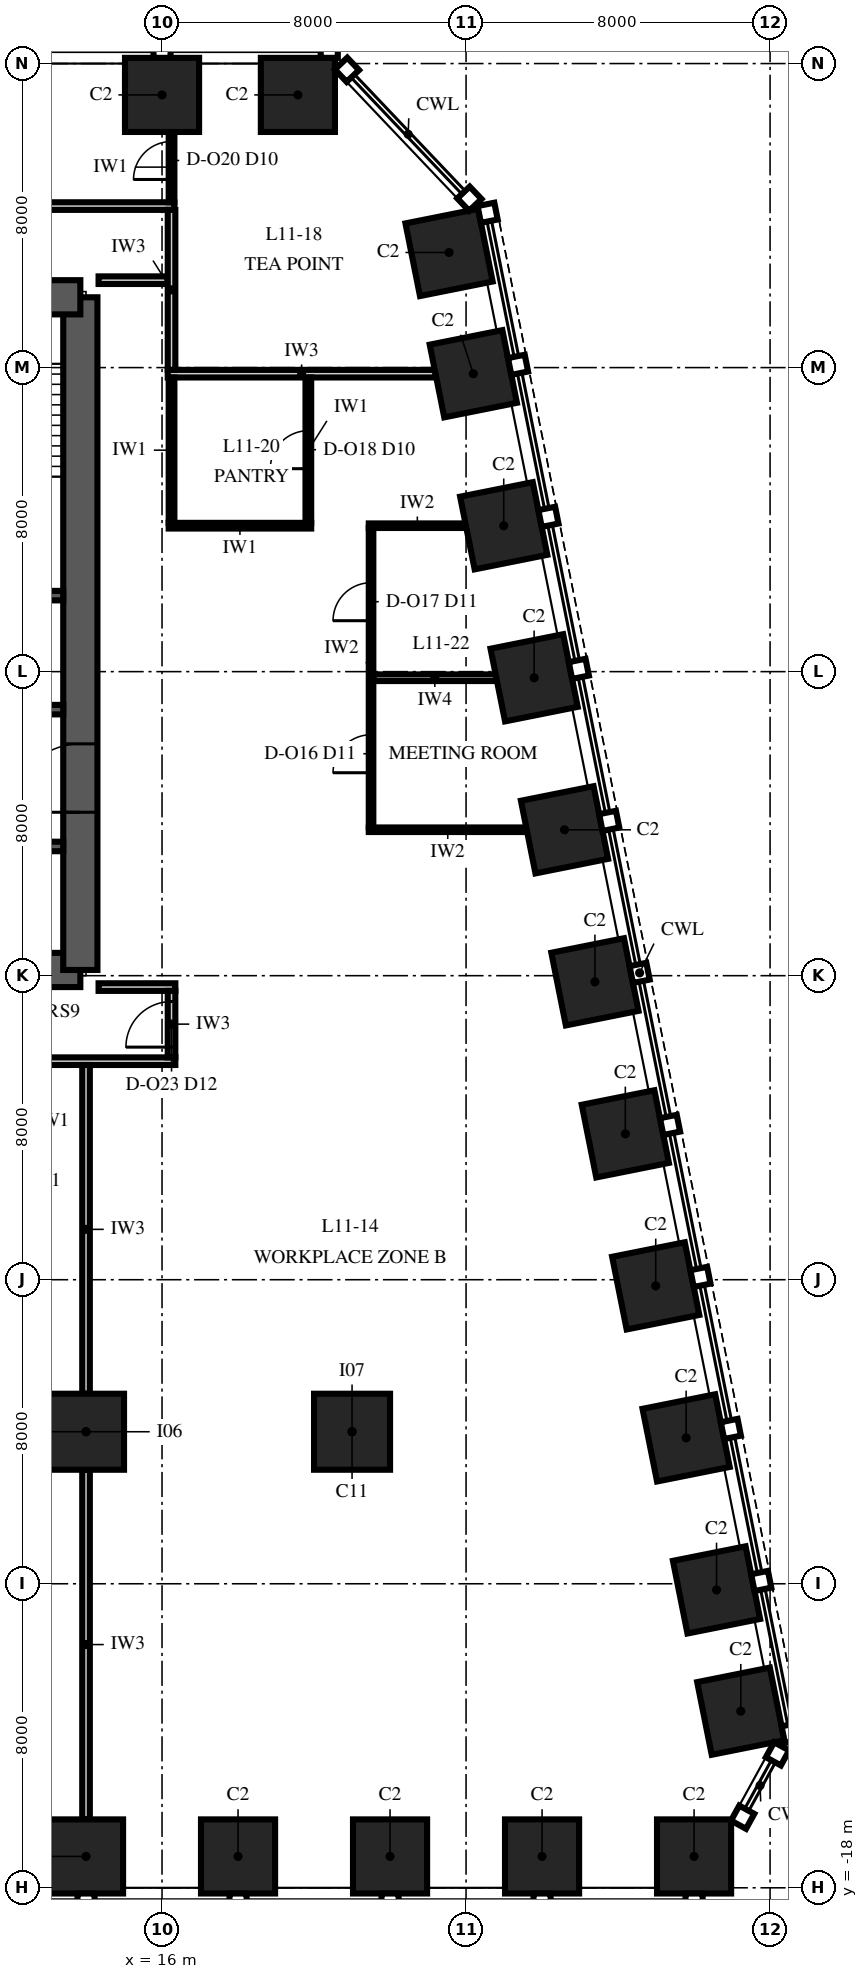
"""IFC4 building model, lengths in metres.
Left out: names, types, materials, properties, quantities, classifications, styles, units other than length and angle.
Written with IfcOpenShell. Run it as: python <this file> out.ifc"""

import sys

from ifc_helpers import new_model, si_unit, direction, frame, frame_2d, origin, origin_2d, place, context, subcontext, project, spatial, polyline, rectangle, outline, extrude, element, fill, save


model = new_model("IFC4")
c1 = context("Model", 3, precision=1e-05, world=origin(), true_north=direction((0.0, 1.0)))
c2 = subcontext(c1, "Body", "Model", "MODEL_VIEW")
j1 = project(units=[si_unit("LENGTHUNIT", "METRE"), si_unit("PLANEANGLEUNIT", "RADIAN")], contexts=[c1])
p1 = place(None, origin())
s1 = spatial("IfcSite", under=j1, at=p1, CompositionType="ELEMENT")
p2 = place(p1, origin())
s2 = spatial("IfcBuilding", under=s1, at=p2, CompositionType="ELEMENT")
p3 = place(p2, frame((0.0, 0.0, 56.0)))
s3 = spatial("IfcBuildingStorey", under=s2, at=p3, CompositionType="ELEMENT", Elevation=56.0)
for number, where, z_axis, x_axis in (
    (1, (14.0, -17.175, 0.0), (0.0, 0.0, 1.0), (1.0, 0.0, 0.0)),
    (2, (18.0, -17.175, 0.0), (0.0, 0.0, 1.0), (1.0, 0.0, 0.0)),
    (3, (22.0, -17.175, 0.0), (0.0, 0.0, 1.0), (1.0, 0.0, 0.0)),
    (4, (26.0, -17.175, 0.0), (0.0, 0.0, 1.0), (1.0, 0.0, 0.0)),
    (5, (30.0, -17.175, 0.0), (0.0, 0.0, 1.0), (1.0, 0.0, 0.0)),
    (6, (31.229, -13.353, 0.0), (0.0, 0.0, 1.0), (-0.196, 0.981, 0.0)),
    (7, (30.591, -10.162, 0.0), (0.0, 0.0, 1.0), (-0.196, 0.981, 0.0)),
    (8, (29.791, -6.162, 0.0), (0.0, 0.0, 1.0), (-0.196, 0.981, 0.0)),
    (9, (28.991, -2.162, 0.0), (0.0, 0.0, 1.0), (-0.196, 0.981, 0.0)),
    (10, (28.191, 1.838, 0.0), (0.0, 0.0, 1.0), (-0.196, 0.981, 0.0)),
    (11, (27.391, 5.838, 0.0), (0.0, 0.0, 1.0), (-0.196, 0.981, 0.0)),
    (12, (26.591, 9.838, 0.0), (0.0, 0.0, 1.0), (-0.196, 0.981, 0.0)),
    (13, (25.791, 13.838, 0.0), (0.0, 0.0, 1.0), (-0.196, 0.981, 0.0)),
    (14, (24.991, 17.838, 0.0), (0.0, 0.0, 1.0), (-0.196, 0.981, 0.0)),
    (15, (24.191, 21.838, 0.0), (0.0, 0.0, 1.0), (-0.196, 0.981, 0.0)),
    (16, (23.553, 25.029, 0.0), (0.0, 0.0, 1.0), (-0.196, 0.981, 0.0)),
    (17, (19.575, 29.175, 0.0), (0.0, 0.0, 1.0), (-1.0, 0.0, 0.0)),
    (18, (16.0, 29.175, 0.0), (0.0, 0.0, 1.0), (-1.0, 0.0, 0.0)),
):
    element("IfcColumn", number, at=place(p3, frame(where, z_axis=z_axis, x_axis=x_axis)), inside=s3, PredefinedType="COLUMN", context=c2, shape_type="SweptSolid", body=[
        extrude(rectangle(XDim=1.95, YDim=1.95, at=origin_2d()), origin(), (0.0, 0.0, 1.0), 4.0),
    ])
for number, where, z_axis, x_axis in (
    (19, (14.0, -6.0, 0.0), (0.0, 0.0, 1.0), (1.0, 0.0, 0.0)),
    (20, (21.0, -6.0, 0.0), (0.0, 0.0, 1.0), (1.0, 0.0, 0.0)),
):
    element("IfcColumn", number, at=place(p3, frame(where, z_axis=z_axis, x_axis=x_axis)), inside=s3, PredefinedType="COLUMN", context=c2, shape_type="SweptSolid", body=[
        extrude(rectangle(XDim=2.0, YDim=2.0, at=origin_2d()), origin(), (0.0, 0.0, 1.0), 4.0),
    ])
p4 = place(p3, frame((-13.85, 6.15, 0.0), z_axis=(0.0, 0.0, 1.0), x_axis=(1.0, 0.0, 0.0)))
e21 = element("IfcWall", 21, at=p4, inside=s3, PredefinedType="SHEAR", context=c2, shape_type="SweptSolid", body=[
    extrude(rectangle(XDim=27.7, YDim=0.9, at=frame_2d((13.85, 0.0))), origin(), (0.0, 0.0, 1.0), 4.0),
])
p5 = place(p3, frame((13.85, 6.15, 0.0), z_axis=(0.0, 0.0, 1.0), x_axis=(0.0, 1.0, 0.0)))
e22 = element("IfcWall", 22, at=p5, inside=s3, PredefinedType="SHEAR", context=c2, shape_type="SweptSolid", body=[
    extrude(outline(polyline([(0.0, -0.45), (17.7, -0.45), (17.7, 0.0), (17.25, 0.0), (17.25, 0.45), (0.45, 0.45), (0.45, 0.0), (0.0, 0.0), (0.0, -0.45)])), origin(), (0.0, 0.0, 1.0), 4.0),
])
p6 = place(p5, frame((4.15, 0.0, 0.0)))
e23 = element("IfcOpeningElement", 23, at=p6, cuts=e22, PredefinedType="OPENING", context=c2, shape_type="SweptSolid", body=[
    extrude(rectangle(XDim=1.8, YDim=2.4, at=frame_2d((0.9, 1.2))), frame((0.0, 0.465, 0.0), z_axis=(0.0, -1.0, 0.0), x_axis=(1.0, 0.0, 0.0)), (0.0, 0.0, 1.0), 0.93),
])
p7 = place(p3, frame((13.85, 23.85, 0.0), z_axis=(0.0, 0.0, 1.0), x_axis=(-1.0, 0.0, 0.0)))
e24 = element("IfcWall", 24, at=p7, inside=s3, PredefinedType="SHEAR", context=c2, shape_type="SweptSolid", body=[
    extrude(rectangle(XDim=27.7, YDim=0.9, at=frame_2d((13.85, 0.0))), origin(), (0.0, 0.0, 1.0), 4.0),
])
p8 = place(p7, frame((21.75, 0.0, 0.0)))
e25 = element("IfcOpeningElement", 25, at=p8, cuts=e24, PredefinedType="OPENING", context=c2, shape_type="SweptSolid", body=[
    extrude(rectangle(XDim=1.0, YDim=2.1, at=frame_2d((0.5, 1.05))), frame((0.0, 0.465, 0.0), z_axis=(0.0, -1.0, 0.0), x_axis=(1.0, 0.0, 0.0)), (0.0, 0.0, 1.0), 0.93),
])
p9 = place(p7, frame((4.95, 0.0, 0.0)))
e26 = element("IfcOpeningElement", 26, at=p9, cuts=e24, PredefinedType="OPENING", context=c2, shape_type="SweptSolid", body=[
    extrude(rectangle(XDim=1.0, YDim=2.1, at=frame_2d((0.5, 1.05))), frame((0.0, 0.465, 0.0), z_axis=(0.0, -1.0, 0.0), x_axis=(1.0, 0.0, 0.0)), (0.0, 0.0, 1.0), 0.93),
])
p10 = place(p7, frame((17.35, 0.0, 0.0)))
e27 = element("IfcOpeningElement", 27, at=p10, cuts=e24, PredefinedType="OPENING", context=c2, shape_type="SweptSolid", body=[
    extrude(rectangle(XDim=1.0, YDim=2.1, at=frame_2d((0.5, 1.05))), frame((0.0, 0.465, 0.0), z_axis=(0.0, -1.0, 0.0), x_axis=(1.0, 0.0, 0.0)), (0.0, 0.0, 1.0), 0.93),
])
p11 = place(p7, frame((13.35, 0.0, 0.0)))
e28 = element("IfcOpeningElement", 28, at=p11, cuts=e24, PredefinedType="OPENING", context=c2, shape_type="SweptSolid", body=[
    extrude(rectangle(XDim=1.0, YDim=2.1, at=frame_2d((0.5, 1.05))), frame((0.0, 0.465, 0.0), z_axis=(0.0, -1.0, 0.0), x_axis=(1.0, 0.0, 0.0)), (0.0, 0.0, 1.0), 0.93),
])
p12 = place(p7, frame((9.35, 0.0, 0.0)))
e29 = element("IfcOpeningElement", 29, at=p12, cuts=e24, PredefinedType="OPENING", context=c2, shape_type="SweptSolid", body=[
    extrude(rectangle(XDim=1.0, YDim=2.1, at=frame_2d((0.5, 1.05))), frame((0.0, 0.465, 0.0), z_axis=(0.0, -1.0, 0.0), x_axis=(1.0, 0.0, 0.0)), (0.0, 0.0, 1.0), 0.93),
])
p13 = place(p3, frame((-13.4, 9.4, 0.0), z_axis=(0.0, 0.0, 1.0), x_axis=(1.0, 0.0, 0.0)))
e30 = element("IfcWall", 30, at=p13, inside=s3, PredefinedType="SHEAR", context=c2, shape_type="SweptSolid", body=[
    extrude(rectangle(XDim=26.8, YDim=0.25, at=frame_2d((13.4, 0.0))), origin(), (0.0, 0.0, 1.0), 4.0),
])
p14 = place(p13, frame((0.25, 0.0, 0.0)))
e31 = element("IfcOpeningElement", 31, at=p14, cuts=e30, PredefinedType="OPENING", context=c2, shape_type="SweptSolid", body=[
    extrude(rectangle(XDim=1.1, YDim=2.1, at=frame_2d((0.55, 1.05))), frame((0.0, 0.14, 0.0), z_axis=(0.0, -1.0, 0.0), x_axis=(1.0, 0.0, 0.0)), (0.0, 0.0, 1.0), 0.28),
])
p15 = place(p13, frame((3.05, 0.0, 0.0)))
e32 = element("IfcOpeningElement", 32, at=p15, cuts=e30, PredefinedType="OPENING", context=c2, shape_type="SweptSolid", body=[
    extrude(rectangle(XDim=1.1, YDim=2.1, at=frame_2d((0.55, 1.05))), frame((0.0, 0.14, 0.0), z_axis=(0.0, -1.0, 0.0), x_axis=(1.0, 0.0, 0.0)), (0.0, 0.0, 1.0), 0.28),
])
p16 = place(p13, frame((5.85, 0.0, 0.0)))
e33 = element("IfcOpeningElement", 33, at=p16, cuts=e30, PredefinedType="OPENING", context=c2, shape_type="SweptSolid", body=[
    extrude(rectangle(XDim=1.1, YDim=2.1, at=frame_2d((0.55, 1.05))), frame((0.0, 0.14, 0.0), z_axis=(0.0, -1.0, 0.0), x_axis=(1.0, 0.0, 0.0)), (0.0, 0.0, 1.0), 0.28),
])
p17 = place(p3, frame((-13.4, 13.0, 0.0), z_axis=(0.0, 0.0, 1.0), x_axis=(1.0, 0.0, 0.0)))
e34 = element("IfcWall", 34, at=p17, inside=s3, PredefinedType="SHEAR", context=c2, shape_type="SweptSolid", body=[
    extrude(rectangle(XDim=26.8, YDim=0.25, at=frame_2d((13.4, 0.0))), origin(), (0.0, 0.0, 1.0), 4.0),
])
p18 = place(p17, frame((0.25, 0.0, 0.0)))
e35 = element("IfcOpeningElement", 35, at=p18, cuts=e34, PredefinedType="OPENING", context=c2, shape_type="SweptSolid", body=[
    extrude(rectangle(XDim=1.1, YDim=2.1, at=frame_2d((0.55, 1.05))), frame((0.0, 0.14, 0.0), z_axis=(0.0, -1.0, 0.0), x_axis=(1.0, 0.0, 0.0)), (0.0, 0.0, 1.0), 0.28),
])
p19 = place(p17, frame((8.65, 0.0, 0.0)))
e36 = element("IfcOpeningElement", 36, at=p19, cuts=e34, PredefinedType="OPENING", context=c2, shape_type="SweptSolid", body=[
    extrude(rectangle(XDim=1.1, YDim=2.1, at=frame_2d((0.55, 1.05))), frame((0.0, 0.14, 0.0), z_axis=(0.0, -1.0, 0.0), x_axis=(1.0, 0.0, 0.0)), (0.0, 0.0, 1.0), 0.28),
])
p20 = place(p17, frame((12.05, 0.0, 0.0)))
e37 = element("IfcOpeningElement", 37, at=p20, cuts=e34, PredefinedType="OPENING", context=c2, shape_type="SweptSolid", body=[
    extrude(rectangle(XDim=1.1, YDim=2.1, at=frame_2d((0.55, 1.05))), frame((0.0, 0.14, 0.0), z_axis=(0.0, -1.0, 0.0), x_axis=(1.0, 0.0, 0.0)), (0.0, 0.0, 1.0), 0.28),
])
p21 = place(p17, frame((15.25, 0.0, 0.0)))
e38 = element("IfcOpeningElement", 38, at=p21, cuts=e34, PredefinedType="OPENING", context=c2, shape_type="SweptSolid", body=[
    extrude(rectangle(XDim=0.9, YDim=2.1, at=frame_2d((0.45, 1.05))), frame((0.0, 0.14, 0.0), z_axis=(0.0, -1.0, 0.0), x_axis=(1.0, 0.0, 0.0)), (0.0, 0.0, 1.0), 0.28),
])
p22 = place(p17, frame((17.65, 0.0, 0.0)))
e39 = element("IfcOpeningElement", 39, at=p22, cuts=e34, PredefinedType="OPENING", context=c2, shape_type="SweptSolid", body=[
    extrude(rectangle(XDim=0.9, YDim=2.1, at=frame_2d((0.45, 1.05))), frame((0.0, 0.14, 0.0), z_axis=(0.0, -1.0, 0.0), x_axis=(1.0, 0.0, 0.0)), (0.0, 0.0, 1.0), 0.28),
])
p23 = place(p3, frame((-13.4, 16.0, 0.0), z_axis=(0.0, 0.0, 1.0), x_axis=(1.0, 0.0, 0.0)))
e40 = element("IfcWall", 40, at=p23, inside=s3, PredefinedType="SHEAR", context=c2, shape_type="SweptSolid", body=[
    extrude(rectangle(XDim=26.8, YDim=0.25, at=frame_2d((13.4, 0.0))), origin(), (0.0, 0.0, 1.0), 4.0),
])
p24 = place(p3, frame((-16.35, 3.75, 0.0), z_axis=(0.0, 0.0, 1.0), x_axis=(1.0, 0.0, 0.0)))
e41 = element("IfcWall", 41, at=p24, inside=s3, PredefinedType="PARTITIONING", context=c2, shape_type="SweptSolid", body=[
    extrude(rectangle(XDim=32.7, YDim=0.2, at=frame_2d((16.35, 0.0))), origin(), (0.0, 0.0, 1.0), 3.25),
])
p25 = place(p24, frame((15.75, 0.0, 0.0)))
e42 = element("IfcOpeningElement", 42, at=p25, cuts=e41, PredefinedType="OPENING", context=c2, shape_type="SweptSolid", body=[
    extrude(rectangle(XDim=1.2, YDim=2.4, at=frame_2d((0.6, 1.2))), frame((0.0, 0.115, 0.0), z_axis=(0.0, -1.0, 0.0), x_axis=(1.0, 0.0, 0.0)), (0.0, 0.0, 1.0), 0.23),
])
p26 = place(p3, frame((14.33, 5.7, 0.0), z_axis=(0.0, 0.0, 1.0), x_axis=(1.0, 0.0, 0.0)))
e43 = element("IfcWall", 43, at=p26, inside=s3, PredefinedType="PARTITIONING", context=c2, shape_type="SweptSolid", body=[
    extrude(rectangle(XDim=2.02, YDim=0.2, at=frame_2d((1.01, 0.0))), origin(), (0.0, 0.0, 1.0), 3.85),
])
p27 = place(p3, frame((21.44, 9.84, 0.0), z_axis=(0.0, 0.0, 1.0), x_axis=(1.0, 0.0, 0.0)))
e44 = element("IfcWall", 44, at=p27, inside=s3, PredefinedType="PARTITIONING", context=c2, shape_type="SweptSolid", body=[
    extrude(rectangle(XDim=4.156, YDim=0.12, at=frame_2d((2.078, 0.0))), origin(), (0.0, 0.0, 1.0), 3.25),
])
p28 = place(p3, frame((21.56, 13.84, 0.0), z_axis=(0.0, 0.0, 1.0), x_axis=(1.0, 0.0, 0.0)))
e45 = element("IfcWall", 45, at=p28, inside=s3, PredefinedType="PARTITIONING", context=c2, shape_type="SweptSolid", body=[
    extrude(rectangle(XDim=3.236, YDim=0.175, at=frame_2d((1.618, 0.0))), origin(), (0.0, 0.0, 1.0), 3.25),
])
p29 = place(p3, frame((16.175, 17.84, 0.0), z_axis=(0.0, 0.0, 1.0), x_axis=(1.0, 0.0, 0.0)))
e46 = element("IfcWall", 46, at=p29, inside=s3, PredefinedType="PARTITIONING", context=c2, shape_type="SweptSolid", body=[
    extrude(rectangle(XDim=3.75, YDim=0.15, at=frame_2d((1.875, 0.0))), origin(), (0.0, 0.0, 1.0), 3.25),
])
p30 = place(p3, frame((21.44, 17.84, 0.0), z_axis=(0.0, 0.0, 1.0), x_axis=(1.0, 0.0, 0.0)))
e47 = element("IfcWall", 47, at=p30, inside=s3, PredefinedType="PARTITIONING", context=c2, shape_type="SweptSolid", body=[
    extrude(rectangle(XDim=2.556, YDim=0.12, at=frame_2d((1.278, 0.0))), origin(), (0.0, 0.0, 1.0), 3.25),
])
p31 = place(p3, frame((16.15, 21.84, 0.0), z_axis=(0.0, 0.0, 1.0), x_axis=(1.0, 0.0, 0.0)))
e48 = element("IfcWall", 48, at=p31, inside=s3, PredefinedType="PARTITIONING", context=c2, shape_type="SweptSolid", body=[
    extrude(rectangle(XDim=7.046, YDim=0.2, at=frame_2d((3.523, 0.0))), origin(), (0.0, 0.0, 1.0), 3.25),
])
p32 = place(p3, frame((14.33, 24.3, 0.0), z_axis=(0.0, 0.0, 1.0), x_axis=(1.0, 0.0, 0.0)))
e49 = element("IfcWall", 49, at=p32, inside=s3, PredefinedType="PARTITIONING", context=c2, shape_type="SweptSolid", body=[
    extrude(rectangle(XDim=1.82, YDim=0.2, at=frame_2d((0.91, 0.0))), origin(), (0.0, 0.0, 1.0), 3.4),
])
p33 = place(p3, frame((-16.31, 26.25, 0.0), z_axis=(0.0, 0.0, 1.0), x_axis=(1.0, 0.0, 0.0)))
e50 = element("IfcWall", 50, at=p33, inside=s3, PredefinedType="PARTITIONING", context=c2, shape_type="SweptSolid", body=[
    extrude(rectangle(XDim=32.635, YDim=0.2, at=frame_2d((16.317, 0.0))), origin(), (0.0, 0.0, 1.0), 3.4),
])
p34 = place(p33, frame((15.71, 0.0, 0.0)))
e51 = element("IfcOpeningElement", 51, at=p34, cuts=e50, PredefinedType="OPENING", context=c2, shape_type="SweptSolid", body=[
    extrude(rectangle(XDim=1.2, YDim=2.4, at=frame_2d((0.6, 1.2))), frame((0.0, 0.115, 0.0), z_axis=(0.0, -1.0, 0.0), x_axis=(1.0, 0.0, 0.0)), (0.0, 0.0, 1.0), 0.23),
])
p35 = place(p3, frame((14.0, -16.2, 0.0), z_axis=(0.0, 0.0, 1.0), x_axis=(0.0, 1.0, 0.0)))
e52 = element("IfcWall", 52, at=p35, inside=s3, PredefinedType="PARTITIONING", context=c2, shape_type="SweptSolid", body=[
    extrude(rectangle(XDim=9.2, YDim=0.2, at=frame_2d((4.6, 0.0))), origin(), (0.0, 0.0, 1.0), 3.25),
])
p36 = place(p3, frame((14.0, -5.0, 0.0), z_axis=(0.0, 0.0, 1.0), x_axis=(0.0, 1.0, 0.0)))
e53 = element("IfcWall", 53, at=p36, inside=s3, PredefinedType="PARTITIONING", context=c2, shape_type="SweptSolid", body=[
    extrude(rectangle(XDim=8.65, YDim=0.2, at=frame_2d((4.325, 0.0))), origin(), (0.0, 0.0, 1.0), 3.25),
])
p37 = place(p3, frame((16.25, 3.85, 0.0), z_axis=(0.0, 0.0, 1.0), x_axis=(0.0, 1.0, 0.0)))
e54 = element("IfcWall", 54, at=p37, inside=s3, PredefinedType="PARTITIONING", context=c2, shape_type="SweptSolid", body=[
    extrude(rectangle(XDim=1.75, YDim=0.2, at=frame_2d((0.875, 0.0))), origin(), (0.0, 0.0, 1.0), 3.85),
])
p38 = place(p37, frame((0.27, 0.0, 0.0)))
e55 = element("IfcOpeningElement", 55, at=p38, cuts=e54, PredefinedType="OPENING", context=c2, shape_type="SweptSolid", body=[
    extrude(rectangle(XDim=1.2, YDim=2.4, at=frame_2d((0.6, 1.2))), frame((0.0, 0.115, 0.0), z_axis=(0.0, -1.0, 0.0), x_axis=(1.0, 0.0, 0.0)), (0.0, 0.0, 1.0), 0.23),
])
p39 = place(p3, frame((16.25, 17.915, 0.0), z_axis=(0.0, 0.0, 1.0), x_axis=(0.0, 1.0, 0.0)))
e56 = element("IfcWall", 56, at=p39, inside=s3, PredefinedType="PARTITIONING", context=c2, shape_type="SweptSolid", body=[
    extrude(rectangle(XDim=3.825, YDim=0.15, at=frame_2d((1.913, 0.0))), origin(), (0.0, 0.0, 1.0), 3.25),
])
p40 = place(p3, frame((16.25, 21.94, 0.0), z_axis=(0.0, 0.0, 1.0), x_axis=(0.0, 1.0, 0.0)))
e57 = element("IfcWall", 57, at=p40, inside=s3, PredefinedType="PARTITIONING", context=c2, shape_type="SweptSolid", body=[
    extrude(rectangle(XDim=4.21, YDim=0.2, at=frame_2d((2.105, 0.0))), origin(), (0.0, 0.0, 1.0), 3.4),
])
p41 = place(p3, frame((16.25, 26.35, 0.0), z_axis=(0.0, 0.0, 1.0), x_axis=(0.0, 1.0, 0.0)))
e58 = element("IfcWall", 58, at=p41, inside=s3, PredefinedType="PARTITIONING", context=c2, shape_type="SweptSolid", body=[
    extrude(rectangle(XDim=1.85, YDim=0.15, at=frame_2d((0.925, 0.0))), origin(), (0.0, 0.0, 1.0), 3.85),
])
p42 = place(p41, frame((0.6, 0.0, 0.0)))
e59 = element("IfcOpeningElement", 59, at=p42, cuts=e58, PredefinedType="OPENING", context=c2, shape_type="SweptSolid", body=[
    extrude(rectangle(XDim=1.0, YDim=2.3, at=frame_2d((0.5, 1.15))), frame((0.0, 0.09, 0.0), z_axis=(0.0, -1.0, 0.0), x_axis=(1.0, 0.0, 0.0)), (0.0, 0.0, 1.0), 0.18),
])
p43 = place(p3, frame((19.85, 17.915, 0.0), z_axis=(0.0, 0.0, 1.0), x_axis=(0.0, 1.0, 0.0)))
e60 = element("IfcWall", 60, at=p43, inside=s3, PredefinedType="PARTITIONING", context=c2, shape_type="SweptSolid", body=[
    extrude(rectangle(XDim=3.825, YDim=0.15, at=frame_2d((1.913, 0.0))), origin(), (0.0, 0.0, 1.0), 3.25),
])
p44 = place(p43, frame((1.425, 0.0, 0.0)))
e61 = element("IfcOpeningElement", 61, at=p44, cuts=e60, PredefinedType="OPENING", context=c2, shape_type="SweptSolid", body=[
    extrude(rectangle(XDim=1.0, YDim=2.3, at=frame_2d((0.5, 1.15))), frame((0.0, 0.09, 0.0), z_axis=(0.0, -1.0, 0.0), x_axis=(1.0, 0.0, 0.0)), (0.0, 0.0, 1.0), 0.18),
])
p45 = place(p3, frame((21.5, 9.9, 0.0), z_axis=(0.0, 0.0, 1.0), x_axis=(0.0, 1.0, 0.0)))
e62 = element("IfcWall", 62, at=p45, inside=s3, PredefinedType="PARTITIONING", context=c2, shape_type="SweptSolid", body=[
    extrude(rectangle(XDim=7.88, YDim=0.12, at=frame_2d((3.94, 0.0))), origin(), (0.0, 0.0, 1.0), 3.25),
])
p46 = place(p45, frame((1.44, 0.0, 0.0)))
e63 = element("IfcOpeningElement", 63, at=p46, cuts=e62, PredefinedType="OPENING", context=c2, shape_type="SweptSolid", body=[
    extrude(rectangle(XDim=1.0, YDim=2.4, at=frame_2d((0.5, 1.2))), frame((0.0, 0.075, 0.0), z_axis=(0.0, -1.0, 0.0), x_axis=(1.0, 0.0, 0.0)), (0.0, 0.0, 1.0), 0.15),
])
p47 = place(p45, frame((5.44, 0.0, 0.0)))
e64 = element("IfcOpeningElement", 64, at=p47, cuts=e62, PredefinedType="OPENING", context=c2, shape_type="SweptSolid", body=[
    extrude(rectangle(XDim=1.0, YDim=2.4, at=frame_2d((0.5, 1.2))), frame((0.0, 0.075, 0.0), z_axis=(0.0, -1.0, 0.0), x_axis=(1.0, 0.0, 0.0)), (0.0, 0.0, 1.0), 0.15),
])
p48 = place(p6, origin())
e65 = element("IfcDoor", 65, at=p48, inside=s3, OperationType="DOUBLE_DOOR_SINGLE_SWING", PredefinedType="DOOR", context=c2, shape_type="SweptSolid", body=[
    extrude(rectangle(XDim=1.8, YDim=2.4, at=frame_2d((0.9, 1.2))), frame((0.0, 0.45, 0.0), z_axis=(0.0, -1.0, 0.0), x_axis=(1.0, 0.0, 0.0)), (0.0, 0.0, 1.0), 0.899),
])
fill(e23, e65)
p49 = place(p46, origin())
e66 = element("IfcDoor", 66, at=p49, inside=s3, OperationType="SINGLE_SWING_RIGHT", PredefinedType="DOOR", context=c2, shape_type="SweptSolid", body=[
    extrude(rectangle(XDim=1.0, YDim=2.4, at=frame_2d((0.5, 1.2))), frame((0.0, 0.06, 0.0), z_axis=(0.0, -1.0, 0.0), x_axis=(1.0, 0.0, 0.0)), (0.0, 0.0, 1.0), 0.12),
])
fill(e63, e66)
p50 = place(p47, origin())
e67 = element("IfcDoor", 67, at=p50, inside=s3, OperationType="SINGLE_SWING_RIGHT", PredefinedType="DOOR", context=c2, shape_type="SweptSolid", body=[
    extrude(rectangle(XDim=1.0, YDim=2.4, at=frame_2d((0.5, 1.2))), frame((0.0, 0.06, 0.0), z_axis=(0.0, -1.0, 0.0), x_axis=(1.0, 0.0, 0.0)), (0.0, 0.0, 1.0), 0.12),
])
fill(e64, e67)
p51 = place(p44, origin())
e68 = element("IfcDoor", 68, at=p51, inside=s3, OperationType="SINGLE_SWING_LEFT", PredefinedType="DOOR", context=c2, shape_type="SweptSolid", body=[
    extrude(rectangle(XDim=1.0, YDim=2.3, at=frame_2d((0.5, 1.15))), frame((0.0, 0.075, 0.0), z_axis=(0.0, -1.0, 0.0), x_axis=(1.0, 0.0, 0.0)), (0.0, 0.0, 1.0), 0.149),
])
fill(e61, e68)
p52 = place(p42, origin())
e69 = element("IfcDoor", 69, at=p52, inside=s3, OperationType="SINGLE_SWING_LEFT", PredefinedType="DOOR", context=c2, shape_type="SweptSolid", body=[
    extrude(rectangle(XDim=1.0, YDim=2.3, at=frame_2d((0.5, 1.15))), frame((0.0, 0.075, 0.0), z_axis=(0.0, -1.0, 0.0), x_axis=(1.0, 0.0, 0.0)), (0.0, 0.0, 1.0), 0.149),
])
fill(e59, e69)
p53 = place(p38, origin())
e70 = element("IfcDoor", 70, at=p53, inside=s3, OperationType="SINGLE_SWING_LEFT", PredefinedType="DOOR", context=c2, shape_type="SweptSolid", body=[
    extrude(rectangle(XDim=1.2, YDim=2.4, at=frame_2d((0.6, 1.2))), frame((0.0, 0.1, 0.0), z_axis=(0.0, -1.0, 0.0), x_axis=(1.0, 0.0, 0.0)), (0.0, 0.0, 1.0), 0.199),
])
fill(e55, e70)
save(model, sys.argv[1])
